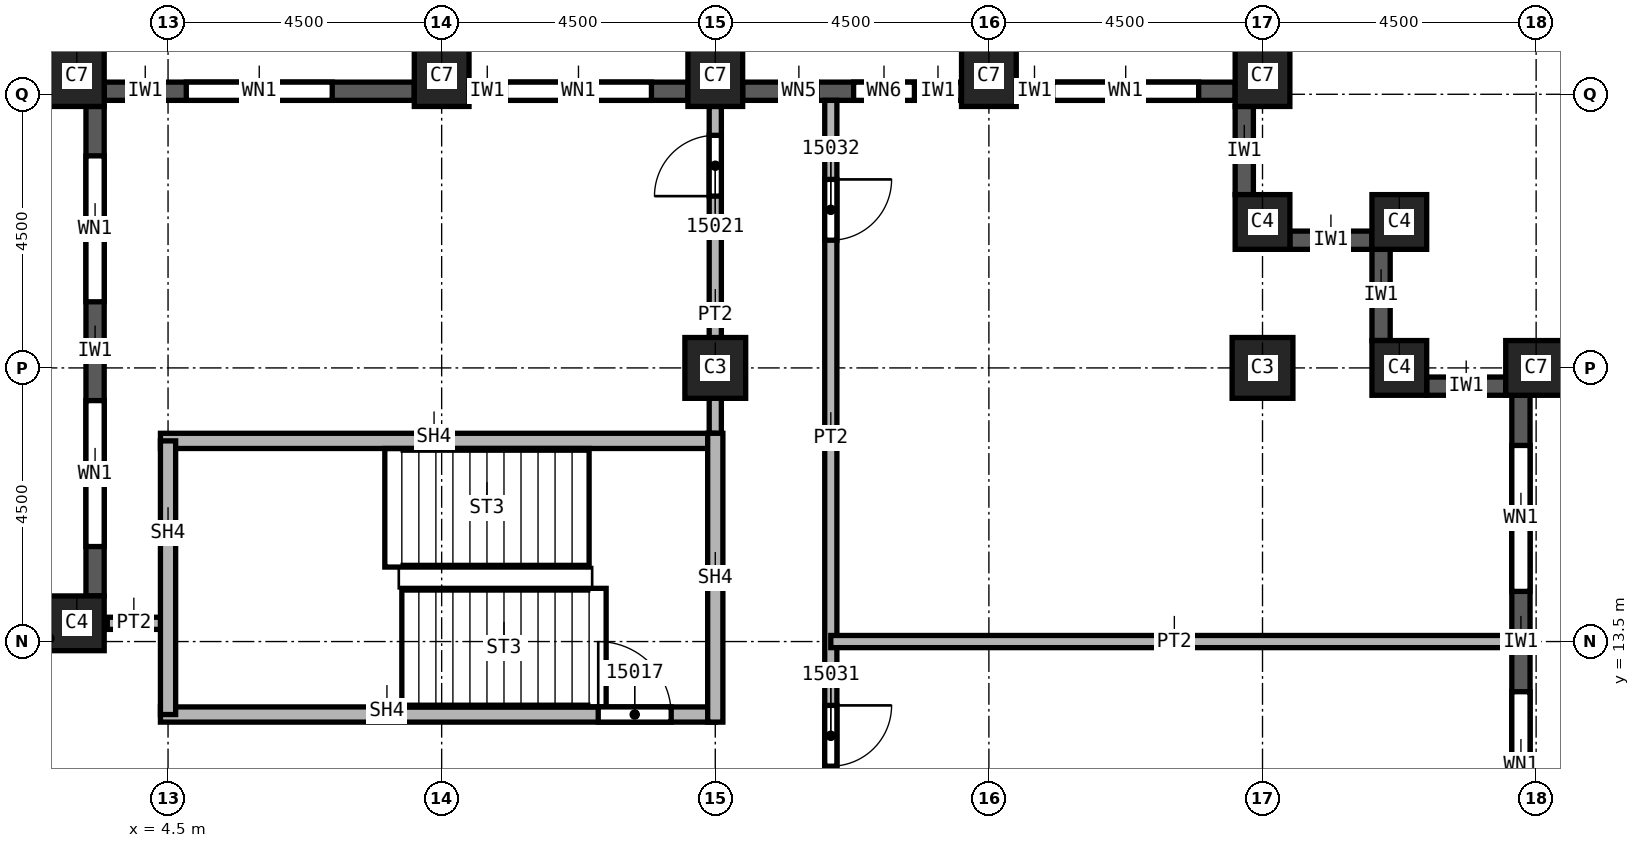
"""IFC4 building model, lengths in metres.
Left out: names, types, materials, properties, quantities, classifications, styles, units other than length and angle.
Written with IfcOpenShell. Run it as: python <this file> out.ifc"""

import sys

from ifc_helpers import new_model, si_unit, direction, frame, frame_2d, origin, origin_2d, place, context, subcontext, project, spatial, rectangle, extrude, element, fill, save


model = new_model("IFC4")
c1 = context("Model", 3, precision=1e-05, world=origin(), true_north=direction((0.0, 1.0)))
c2 = subcontext(c1, "Body", "Model", "MODEL_VIEW")
j1 = project(units=[si_unit("LENGTHUNIT", "METRE"), si_unit("PLANEANGLEUNIT", "RADIAN")], contexts=[c1])
p1 = place(None, origin())
s1 = spatial("IfcSite", under=j1, at=p1, CompositionType="ELEMENT")
p2 = place(p1, origin())
s2 = spatial("IfcBuilding", under=s1, at=p2, CompositionType="ELEMENT")
p3 = place(p2, frame((0.0, 0.0, 228.0)))
s3 = spatial("IfcBuildingStorey", under=s2, at=p3, CompositionType="ELEMENT", Elevation=228.0)
for number, where, z_axis, x_axis in (
    (1, (13.5, 18.0, 0.0), (0.0, 0.0, 1.0), (1.0, 0.0, 0.0)),
    (2, (22.5, 18.0, 0.0), (0.0, 0.0, 1.0), (1.0, 0.0, 0.0)),
):
    element("IfcColumn", number, at=place(p3, frame(where, z_axis=z_axis, x_axis=x_axis)), inside=s3, PredefinedType="COLUMN", context=c2, shape_type="SweptSolid", body=[
        extrude(rectangle(XDim=1.0, YDim=1.0, at=origin_2d()), origin(), (0.0, 0.0, 1.0), 3.72),
    ])
for number, where, z_axis, x_axis in (
    (3, (27.0, 18.0, 0.0), (0.0, 0.0, 1.0), (0.0, 1.0, 0.0)),
    (4, (3.0, 22.8, 0.0), (0.0, 0.0, 1.0), (1.0, 0.0, 0.0)),
    (5, (9.0, 22.8, 0.0), (0.0, 0.0, 1.0), (1.0, 0.0, 0.0)),
    (6, (13.5, 22.8, 0.0), (0.0, 0.0, 1.0), (1.0, 0.0, 0.0)),
    (7, (18.0, 22.8, 0.0), (0.0, 0.0, 1.0), (1.0, 0.0, 0.0)),
    (8, (22.5, 22.8, 0.0), (0.0, 0.0, 1.0), (1.0, 0.0, 0.0)),
):
    element("IfcColumn", number, at=place(p3, frame(where, z_axis=z_axis, x_axis=x_axis)), inside=s3, PredefinedType="COLUMN", context=c2, shape_type="SweptSolid", body=[
        extrude(rectangle(XDim=0.9, YDim=1.0, at=origin_2d()), origin(), (0.0, 0.0, 1.0), 3.72),
    ])
for number, where, z_axis, x_axis in (
    (9, (3.0, 13.8, 0.0), (0.0, 0.0, 1.0), (1.0, 0.0, 0.0)),
    (10, (22.5, 20.4, 0.0), (0.0, 0.0, 1.0), (1.0, 0.0, 0.0)),
    (11, (24.75, 20.4, 0.0), (0.0, 0.0, 1.0), (1.0, 0.0, 0.0)),
    (12, (24.75, 18.0, 0.0), (0.0, 0.0, 1.0), (1.0, 0.0, 0.0)),
):
    element("IfcColumn", number, at=place(p3, frame(where, z_axis=z_axis, x_axis=x_axis)), inside=s3, PredefinedType="COLUMN", context=c2, shape_type="SweptSolid", body=[
        extrude(rectangle(XDim=0.9, YDim=0.9, at=origin_2d()), origin(), (0.0, 0.0, 1.0), 3.72),
    ])
p4 = place(p3, frame((26.75, 9.45, 0.0), z_axis=(0.0, 0.0, 1.0), x_axis=(0.0, 1.0, 0.0)))
e13 = element("IfcWall", 13, at=p4, inside=s3, PredefinedType="SOLIDWALL", context=c2, shape_type="SweptSolid", body=[
    extrude(rectangle(XDim=8.1, YDim=0.3, at=frame_2d((4.05, 0.0))), origin(), (0.0, 0.0, 1.0), 3.12),
])
p5 = place(p4, frame((0.825, 0.0, 0.8)))
e14 = element("IfcOpeningElement", 14, at=p5, cuts=e13, PredefinedType="OPENING", context=c2, shape_type="SweptSolid", body=[
    extrude(rectangle(XDim=2.4, YDim=1.95, at=frame_2d((1.2, 0.975))), frame((0.0, 0.15, 0.0), z_axis=(0.0, -1.0, 0.0), x_axis=(1.0, 0.0, 0.0)), (0.0, 0.0, 1.0), 0.3),
])
p6 = place(p4, frame((4.875, 0.0, 0.8)))
e15 = element("IfcOpeningElement", 15, at=p6, cuts=e13, PredefinedType="OPENING", context=c2, shape_type="SweptSolid", body=[
    extrude(rectangle(XDim=2.4, YDim=1.95, at=frame_2d((1.2, 0.975))), frame((0.0, 0.15, 0.0), z_axis=(0.0, -1.0, 0.0), x_axis=(1.0, 0.0, 0.0)), (0.0, 0.0, 1.0), 0.3),
])
p7 = place(p3, frame((26.5, 17.7, 0.0), z_axis=(0.0, 0.0, 1.0), x_axis=(-1.0, 0.0, 0.0)))
e16 = element("IfcWall", 16, at=p7, inside=s3, PredefinedType="SOLIDWALL", context=c2, shape_type="SweptSolid", body=[
    extrude(rectangle(XDim=1.3, YDim=0.3, at=frame_2d((0.65, 0.0))), origin(), (0.0, 0.0, 1.0), 3.12),
])
p8 = place(p3, frame((24.45, 18.45, 0.0), z_axis=(0.0, 0.0, 1.0), x_axis=(0.0, 1.0, 0.0)))
e17 = element("IfcWall", 17, at=p8, inside=s3, PredefinedType="SOLIDWALL", context=c2, shape_type="SweptSolid", body=[
    extrude(rectangle(XDim=1.5, YDim=0.3, at=frame_2d((0.75, 0.0))), origin(), (0.0, 0.0, 1.0), 3.12),
])
p9 = place(p3, frame((24.3, 20.1, 0.0), z_axis=(0.0, 0.0, 1.0), x_axis=(-1.0, 0.0, 0.0)))
e18 = element("IfcWall", 18, at=p9, inside=s3, PredefinedType="SOLIDWALL", context=c2, shape_type="SweptSolid", body=[
    extrude(rectangle(XDim=1.35, YDim=0.3, at=frame_2d((0.675, 0.0))), origin(), (0.0, 0.0, 1.0), 3.12),
])
p10 = place(p3, frame((22.2, 20.85, 0.0), z_axis=(0.0, 0.0, 1.0), x_axis=(0.0, 1.0, 0.0)))
e19 = element("IfcWall", 19, at=p10, inside=s3, PredefinedType="SOLIDWALL", context=c2, shape_type="SweptSolid", body=[
    extrude(rectangle(XDim=1.45, YDim=0.3, at=frame_2d((0.725, 0.0))), origin(), (0.0, 0.0, 1.0), 3.12),
])
p11 = place(p3, frame((22.05, 22.55, 0.0), z_axis=(0.0, 0.0, 1.0), x_axis=(-1.0, 0.0, 0.0)))
e20 = element("IfcWall", 20, at=p11, inside=s3, PredefinedType="SOLIDWALL", context=c2, shape_type="SweptSolid", body=[
    extrude(rectangle(XDim=3.6, YDim=0.3, at=frame_2d((1.8, 0.0))), origin(), (0.0, 0.0, 1.0), 3.12),
])
p12 = place(p11, frame((0.6, 0.0, 0.8)))
e21 = element("IfcOpeningElement", 21, at=p12, cuts=e20, PredefinedType="OPENING", context=c2, shape_type="SweptSolid", body=[
    extrude(rectangle(XDim=2.4, YDim=1.95, at=frame_2d((1.2, 0.975))), frame((0.0, 0.15, 0.0), z_axis=(0.0, -1.0, 0.0), x_axis=(1.0, 0.0, 0.0)), (0.0, 0.0, 1.0), 0.3),
])
p13 = place(p3, frame((17.55, 22.55, 0.0), z_axis=(0.0, 0.0, 1.0), x_axis=(-1.0, 0.0, 0.0)))
e22 = element("IfcWall", 22, at=p13, inside=s3, PredefinedType="SOLIDWALL", context=c2, shape_type="SweptSolid", body=[
    extrude(rectangle(XDim=3.6, YDim=0.3, at=frame_2d((1.8, 0.0))), origin(), (0.0, 0.0, 1.0), 3.12),
])
p14 = place(p13, frame((0.775, 0.0, 0.8)))
e23 = element("IfcOpeningElement", 23, at=p14, cuts=e22, PredefinedType="OPENING", context=c2, shape_type="SweptSolid", body=[
    extrude(rectangle(XDim=1.0, YDim=1.95, at=frame_2d((0.5, 0.975))), frame((0.0, 0.15, 0.0), z_axis=(0.0, -1.0, 0.0), x_axis=(1.0, 0.0, 0.0)), (0.0, 0.0, 1.0), 0.3),
])
p15 = place(p13, frame((2.375, 0.0, 0.8)))
e24 = element("IfcOpeningElement", 24, at=p15, cuts=e22, PredefinedType="OPENING", context=c2, shape_type="SweptSolid", body=[
    extrude(rectangle(XDim=0.6, YDim=1.95, at=frame_2d((0.3, 0.975))), frame((0.0, 0.15, 0.0), z_axis=(0.0, -1.0, 0.0), x_axis=(1.0, 0.0, 0.0)), (0.0, 0.0, 1.0), 0.3),
])
p16 = place(p3, frame((13.05, 22.55, 0.0), z_axis=(0.0, 0.0, 1.0), x_axis=(-1.0, 0.0, 0.0)))
e25 = element("IfcWall", 25, at=p16, inside=s3, PredefinedType="SOLIDWALL", context=c2, shape_type="SweptSolid", body=[
    extrude(rectangle(XDim=3.6, YDim=0.3, at=frame_2d((1.8, 0.0))), origin(), (0.0, 0.0, 1.0), 3.12),
])
p17 = place(p16, frame((0.6, 0.0, 0.8)))
e26 = element("IfcOpeningElement", 26, at=p17, cuts=e25, PredefinedType="OPENING", context=c2, shape_type="SweptSolid", body=[
    extrude(rectangle(XDim=2.4, YDim=1.95, at=frame_2d((1.2, 0.975))), frame((0.0, 0.15, 0.0), z_axis=(0.0, -1.0, 0.0), x_axis=(1.0, 0.0, 0.0)), (0.0, 0.0, 1.0), 0.3),
])
p18 = place(p3, frame((8.55, 22.55, 0.0), z_axis=(0.0, 0.0, 1.0), x_axis=(-1.0, 0.0, 0.0)))
e27 = element("IfcWall", 27, at=p18, inside=s3, PredefinedType="SOLIDWALL", context=c2, shape_type="SweptSolid", body=[
    extrude(rectangle(XDim=5.1, YDim=0.3, at=frame_2d((2.55, 0.0))), origin(), (0.0, 0.0, 1.0), 3.12),
])
p19 = place(p18, frame((1.35, 0.0, 0.8)))
e28 = element("IfcOpeningElement", 28, at=p19, cuts=e27, PredefinedType="OPENING", context=c2, shape_type="SweptSolid", body=[
    extrude(rectangle(XDim=2.4, YDim=1.95, at=frame_2d((1.2, 0.975))), frame((0.0, 0.15, 0.0), z_axis=(0.0, -1.0, 0.0), x_axis=(1.0, 0.0, 0.0)), (0.0, 0.0, 1.0), 0.3),
])
p20 = place(p3, frame((3.3, 22.3, 0.0), z_axis=(0.0, 0.0, 1.0), x_axis=(0.0, -1.0, 0.0)))
e29 = element("IfcWall", 29, at=p20, inside=s3, PredefinedType="SOLIDWALL", context=c2, shape_type="SweptSolid", body=[
    extrude(rectangle(XDim=8.05, YDim=0.3, at=frame_2d((4.025, 0.0))), origin(), (0.0, 0.0, 1.0), 3.12),
])
p21 = place(p20, frame((0.812, 0.0, 0.8)))
e30 = element("IfcOpeningElement", 30, at=p21, cuts=e29, PredefinedType="OPENING", context=c2, shape_type="SweptSolid", body=[
    extrude(rectangle(XDim=2.4, YDim=1.95, at=frame_2d((1.2, 0.975))), frame((0.0, 0.15, 0.0), z_axis=(0.0, -1.0, 0.0), x_axis=(1.0, 0.0, 0.0)), (0.0, 0.0, 1.0), 0.3),
])
p22 = place(p20, frame((4.837, 0.0, 0.8)))
e31 = element("IfcOpeningElement", 31, at=p22, cuts=e29, PredefinedType="OPENING", context=c2, shape_type="SweptSolid", body=[
    extrude(rectangle(XDim=2.4, YDim=1.95, at=frame_2d((1.2, 0.975))), frame((0.0, 0.15, 0.0), z_axis=(0.0, -1.0, 0.0), x_axis=(1.0, 0.0, 0.0)), (0.0, 0.0, 1.0), 0.3),
])
p23 = place(p3, frame((3.5, 13.8, 0.0), z_axis=(0.0, 0.0, 1.0), x_axis=(1.0, 0.0, 0.0)))
e32 = element("IfcWall", 32, at=p23, inside=s3, PredefinedType="PARTITIONING", context=c2, shape_type="SweptSolid", body=[
    extrude(rectangle(XDim=0.999, YDim=0.2, at=frame_2d((0.5, 0.0))), origin(), (0.0, 0.0, 1.0), 3.72),
])
p24 = place(p3, frame((13.5, 16.675, 0.0), z_axis=(0.0, 0.0, 1.0), x_axis=(0.0, 1.0, 0.0)))
e33 = element("IfcWall", 33, at=p24, inside=s3, PredefinedType="PARTITIONING", context=c2, shape_type="SweptSolid", body=[
    extrude(rectangle(XDim=5.625, YDim=0.2, at=frame_2d((2.812, 0.0))), origin(), (0.0, 0.0, 1.0), 3.72),
])
p25 = place(p24, frame((4.15, 0.0, 0.0)))
e34 = element("IfcOpeningElement", 34, at=p25, cuts=e33, PredefinedType="OPENING", context=c2, shape_type="SweptSolid", body=[
    extrude(rectangle(XDim=1.0, YDim=2.1, at=frame_2d((0.5, 1.05))), frame((0.0, 0.1, 0.0), z_axis=(0.0, -1.0, 0.0), x_axis=(1.0, 0.0, 0.0)), (0.0, 0.0, 1.0), 0.2),
])
p26 = place(p3, frame((15.4, 22.4, 0.0), z_axis=(0.0, 0.0, 1.0), x_axis=(0.0, -1.0, 0.0)))
e35 = element("IfcWall", 35, at=p26, inside=s3, PredefinedType="PARTITIONING", context=c2, shape_type="SweptSolid", body=[
    extrude(rectangle(XDim=44.8, YDim=0.2, at=frame_2d((22.4, 0.0))), origin(), (0.0, 0.0, 1.0), 3.72),
])
p27 = place(p26, frame((18.5, 0.0, 0.0)))
e36 = element("IfcOpeningElement", 36, at=p27, cuts=e35, PredefinedType="OPENING", context=c2, shape_type="SweptSolid", body=[
    extrude(rectangle(XDim=1.0, YDim=2.1, at=frame_2d((0.5, 1.05))), frame((0.0, 0.1, 0.0), z_axis=(0.0, -1.0, 0.0), x_axis=(1.0, 0.0, 0.0)), (0.0, 0.0, 1.0), 0.2),
])
p28 = place(p26, frame((9.95, 0.0, 0.0)))
e37 = element("IfcOpeningElement", 37, at=p28, cuts=e35, PredefinedType="OPENING", context=c2, shape_type="SweptSolid", body=[
    extrude(rectangle(XDim=1.0, YDim=2.1, at=frame_2d((0.5, 1.05))), frame((0.0, 0.1, 0.0), z_axis=(0.0, -1.0, 0.0), x_axis=(1.0, 0.0, 0.0)), (0.0, 0.0, 1.0), 0.2),
])
p29 = place(p26, frame((1.3, 0.0, 0.0)))
e38 = element("IfcOpeningElement", 38, at=p29, cuts=e35, PredefinedType="OPENING", context=c2, shape_type="SweptSolid", body=[
    extrude(rectangle(XDim=1.0, YDim=2.1, at=frame_2d((0.5, 1.05))), frame((0.0, 0.1, 0.0), z_axis=(0.0, -1.0, 0.0), x_axis=(1.0, 0.0, 0.0)), (0.0, 0.0, 1.0), 0.2),
])
p30 = place(p26, frame((43.55, 0.0, 0.0)))
e39 = element("IfcOpeningElement", 39, at=p30, cuts=e35, PredefinedType="OPENING", context=c2, shape_type="SweptSolid", body=[
    extrude(rectangle(XDim=1.0, YDim=2.1, at=frame_2d((0.5, 1.05))), frame((0.0, 0.1, 0.0), z_axis=(0.0, -1.0, 0.0), x_axis=(1.0, 0.0, 0.0)), (0.0, 0.0, 1.0), 0.2),
])
p31 = place(p26, frame((38.3, 0.0, 0.0)))
e40 = element("IfcOpeningElement", 40, at=p31, cuts=e35, PredefinedType="OPENING", context=c2, shape_type="SweptSolid", body=[
    extrude(rectangle(XDim=1.0, YDim=2.1, at=frame_2d((0.5, 1.05))), frame((0.0, 0.1, 0.0), z_axis=(0.0, -1.0, 0.0), x_axis=(1.0, 0.0, 0.0)), (0.0, 0.0, 1.0), 0.2),
])
p32 = place(p26, frame((30.65, 0.0, 0.0)))
e41 = element("IfcOpeningElement", 41, at=p32, cuts=e35, PredefinedType="OPENING", context=c2, shape_type="SweptSolid", body=[
    extrude(rectangle(XDim=1.0, YDim=2.1, at=frame_2d((0.5, 1.05))), frame((0.0, 0.1, 0.0), z_axis=(0.0, -1.0, 0.0), x_axis=(1.0, 0.0, 0.0)), (0.0, 0.0, 1.0), 0.2),
])
p33 = place(p26, frame((24.2, 0.0, 0.0)))
e42 = element("IfcOpeningElement", 42, at=p33, cuts=e35, PredefinedType="OPENING", context=c2, shape_type="SweptSolid", body=[
    extrude(rectangle(XDim=1.0, YDim=2.1, at=frame_2d((0.5, 1.05))), frame((0.0, 0.1, 0.0), z_axis=(0.0, -1.0, 0.0), x_axis=(1.0, 0.0, 0.0)), (0.0, 0.0, 1.0), 0.2),
])
p34 = place(p3, frame((15.4, 13.5, 0.0), z_axis=(0.0, 0.0, 1.0), x_axis=(1.0, 0.0, 0.0)))
e43 = element("IfcWall", 43, at=p34, inside=s3, PredefinedType="PARTITIONING", context=c2, shape_type="SweptSolid", body=[
    extrude(rectangle(XDim=11.2, YDim=0.2, at=frame_2d((5.6, 0.0))), origin(), (0.0, 0.0, 1.0), 3.72),
])
p35 = place(p3, frame((4.375, 12.3, 0.0), z_axis=(0.0, 0.0, 1.0), x_axis=(1.0, 0.0, 0.0)))
e44 = element("IfcWall", 44, at=p35, inside=s3, PredefinedType="SOLIDWALL", context=c2, shape_type="SweptSolid", body=[
    extrude(rectangle(XDim=9.125, YDim=0.25, at=frame_2d((4.562, 0.0))), origin(), (0.0, 0.0, 1.0), 3.72),
])
p36 = place(p35, frame((7.2, 0.0, 0.0)))
e45 = element("IfcOpeningElement", 45, at=p36, cuts=e44, PredefinedType="OPENING", context=c2, shape_type="SweptSolid", body=[
    extrude(rectangle(XDim=1.2, YDim=2.1, at=frame_2d((0.6, 1.05))), frame((0.0, 0.125, 0.0), z_axis=(0.0, -1.0, 0.0), x_axis=(1.0, 0.0, 0.0)), (0.0, 0.0, 1.0), 0.25),
])
p37 = place(p3, frame((4.375, 16.8, 0.0), z_axis=(0.0, 0.0, 1.0), x_axis=(1.0, 0.0, 0.0)))
e46 = element("IfcWall", 46, at=p37, inside=s3, PredefinedType="SOLIDWALL", context=c2, shape_type="SweptSolid", body=[
    extrude(rectangle(XDim=9.125, YDim=0.25, at=frame_2d((4.562, 0.0))), origin(), (0.0, 0.0, 1.0), 3.72),
])
p38 = place(p3, frame((4.5, 12.3, 0.0), z_axis=(0.0, 0.0, 1.0), x_axis=(0.0, 1.0, 0.0)))
e47 = element("IfcWall", 47, at=p38, inside=s3, PredefinedType="SOLIDWALL", context=c2, shape_type="SweptSolid", body=[
    extrude(rectangle(XDim=4.5, YDim=0.25, at=frame_2d((2.25, 0.0))), origin(), (0.0, 0.0, 1.0), 3.72),
])
p39 = place(p3, frame((13.5, 12.175, 0.0), z_axis=(0.0, 0.0, 1.0), x_axis=(0.0, 1.0, 0.0)))
e48 = element("IfcWall", 48, at=p39, inside=s3, PredefinedType="SOLIDWALL", context=c2, shape_type="SweptSolid", body=[
    extrude(rectangle(XDim=4.75, YDim=0.25, at=frame_2d((2.375, 0.0))), origin(), (0.0, 0.0, 1.0), 3.72),
])
p40 = place(p5, origin())
e49 = element("IfcWindow", 49, at=p40, inside=s3, PartitioningType="SINGLE_PANEL", PredefinedType="WINDOW", context=c2, shape_type="SweptSolid", body=[
    extrude(rectangle(XDim=2.4, YDim=1.95, at=frame_2d((1.2, 0.975))), frame((0.0, 0.03, 0.0), z_axis=(0.0, -1.0, 0.0), x_axis=(1.0, 0.0, 0.0)), (0.0, 0.0, 1.0), 0.06),
])
fill(e14, e49)
p41 = place(p6, origin())
e50 = element("IfcWindow", 50, at=p41, inside=s3, PartitioningType="SINGLE_PANEL", PredefinedType="WINDOW", context=c2, shape_type="SweptSolid", body=[
    extrude(rectangle(XDim=2.4, YDim=1.95, at=frame_2d((1.2, 0.975))), frame((0.0, 0.03, 0.0), z_axis=(0.0, -1.0, 0.0), x_axis=(1.0, 0.0, 0.0)), (0.0, 0.0, 1.0), 0.06),
])
fill(e15, e50)
p42 = place(p12, origin())
e51 = element("IfcWindow", 51, at=p42, inside=s3, PartitioningType="SINGLE_PANEL", PredefinedType="WINDOW", context=c2, shape_type="SweptSolid", body=[
    extrude(rectangle(XDim=2.4, YDim=1.95, at=frame_2d((1.2, 0.975))), frame((0.0, 0.03, 0.0), z_axis=(0.0, -1.0, 0.0), x_axis=(1.0, 0.0, 0.0)), (0.0, 0.0, 1.0), 0.06),
])
fill(e21, e51)
p43 = place(p17, origin())
e52 = element("IfcWindow", 52, at=p43, inside=s3, PartitioningType="SINGLE_PANEL", PredefinedType="WINDOW", context=c2, shape_type="SweptSolid", body=[
    extrude(rectangle(XDim=2.4, YDim=1.95, at=frame_2d((1.2, 0.975))), frame((0.0, 0.03, 0.0), z_axis=(0.0, -1.0, 0.0), x_axis=(1.0, 0.0, 0.0)), (0.0, 0.0, 1.0), 0.06),
])
fill(e26, e52)
p44 = place(p19, origin())
e53 = element("IfcWindow", 53, at=p44, inside=s3, PartitioningType="SINGLE_PANEL", PredefinedType="WINDOW", context=c2, shape_type="SweptSolid", body=[
    extrude(rectangle(XDim=2.4, YDim=1.95, at=frame_2d((1.2, 0.975))), frame((0.0, 0.03, 0.0), z_axis=(0.0, -1.0, 0.0), x_axis=(1.0, 0.0, 0.0)), (0.0, 0.0, 1.0), 0.06),
])
fill(e28, e53)
p45 = place(p21, origin())
e54 = element("IfcWindow", 54, at=p45, inside=s3, PartitioningType="SINGLE_PANEL", PredefinedType="WINDOW", context=c2, shape_type="SweptSolid", body=[
    extrude(rectangle(XDim=2.4, YDim=1.95, at=frame_2d((1.2, 0.975))), frame((0.0, 0.03, 0.0), z_axis=(0.0, -1.0, 0.0), x_axis=(1.0, 0.0, 0.0)), (0.0, 0.0, 1.0), 0.06),
])
fill(e30, e54)
p46 = place(p22, origin())
e55 = element("IfcWindow", 55, at=p46, inside=s3, PartitioningType="SINGLE_PANEL", PredefinedType="WINDOW", context=c2, shape_type="SweptSolid", body=[
    extrude(rectangle(XDim=2.4, YDim=1.95, at=frame_2d((1.2, 0.975))), frame((0.0, 0.03, 0.0), z_axis=(0.0, -1.0, 0.0), x_axis=(1.0, 0.0, 0.0)), (0.0, 0.0, 1.0), 0.06),
])
fill(e31, e55)
p47 = place(p36, origin())
e56 = element("IfcDoor", 56, at=p47, inside=s3, OperationType="SINGLE_SWING_RIGHT", PredefinedType="DOOR", context=c2, shape_type="SweptSolid", body=[
    extrude(rectangle(XDim=1.2, YDim=2.1, at=frame_2d((0.6, 1.05))), frame((0.0, 0.025, 0.0), z_axis=(0.0, -1.0, 0.0), x_axis=(1.0, 0.0, 0.0)), (0.0, 0.0, 1.0), 0.05),
])
fill(e45, e56)
p48 = place(p25, origin())
e57 = element("IfcDoor", 57, at=p48, inside=s3, OperationType="SINGLE_SWING_RIGHT", PredefinedType="DOOR", context=c2, shape_type="SweptSolid", body=[
    extrude(rectangle(XDim=1.0, YDim=2.1, at=frame_2d((0.5, 1.05))), frame((0.0, 0.025, 0.0), z_axis=(0.0, -1.0, 0.0), x_axis=(1.0, 0.0, 0.0)), (0.0, 0.0, 1.0), 0.05),
])
fill(e34, e57)
p49 = place(p28, origin())
e58 = element("IfcDoor", 58, at=p49, inside=s3, OperationType="SINGLE_SWING_RIGHT", PredefinedType="DOOR", context=c2, shape_type="SweptSolid", body=[
    extrude(rectangle(XDim=1.0, YDim=2.1, at=frame_2d((0.5, 1.05))), frame((0.0, 0.025, 0.0), z_axis=(0.0, -1.0, 0.0), x_axis=(1.0, 0.0, 0.0)), (0.0, 0.0, 1.0), 0.05),
])
fill(e37, e58)
p50 = place(p29, origin())
e59 = element("IfcDoor", 59, at=p50, inside=s3, OperationType="SINGLE_SWING_LEFT", PredefinedType="DOOR", context=c2, shape_type="SweptSolid", body=[
    extrude(rectangle(XDim=1.0, YDim=2.1, at=frame_2d((0.5, 1.05))), frame((0.0, 0.025, 0.0), z_axis=(0.0, -1.0, 0.0), x_axis=(1.0, 0.0, 0.0)), (0.0, 0.0, 1.0), 0.05),
])
fill(e38, e59)
p51 = place(p14, origin())
e60 = element("IfcWindow", 60, at=p51, inside=s3, PartitioningType="SINGLE_PANEL", PredefinedType="WINDOW", context=c2, shape_type="SweptSolid", body=[
    extrude(rectangle(XDim=1.0, YDim=1.95, at=frame_2d((0.5, 0.975))), frame((0.0, 0.03, 0.0), z_axis=(0.0, -1.0, 0.0), x_axis=(1.0, 0.0, 0.0)), (0.0, 0.0, 1.0), 0.06),
])
fill(e23, e60)
p52 = place(p15, origin())
e61 = element("IfcWindow", 61, at=p52, inside=s3, PartitioningType="SINGLE_PANEL", PredefinedType="WINDOW", context=c2, shape_type="SweptSolid", body=[
    extrude(rectangle(XDim=0.6, YDim=1.95, at=frame_2d((0.3, 0.975))), frame((0.0, 0.03, 0.0), z_axis=(0.0, -1.0, 0.0), x_axis=(1.0, 0.0, 0.0)), (0.0, 0.0, 1.0), 0.06),
])
fill(e24, e61)
save(model, sys.argv[1])
